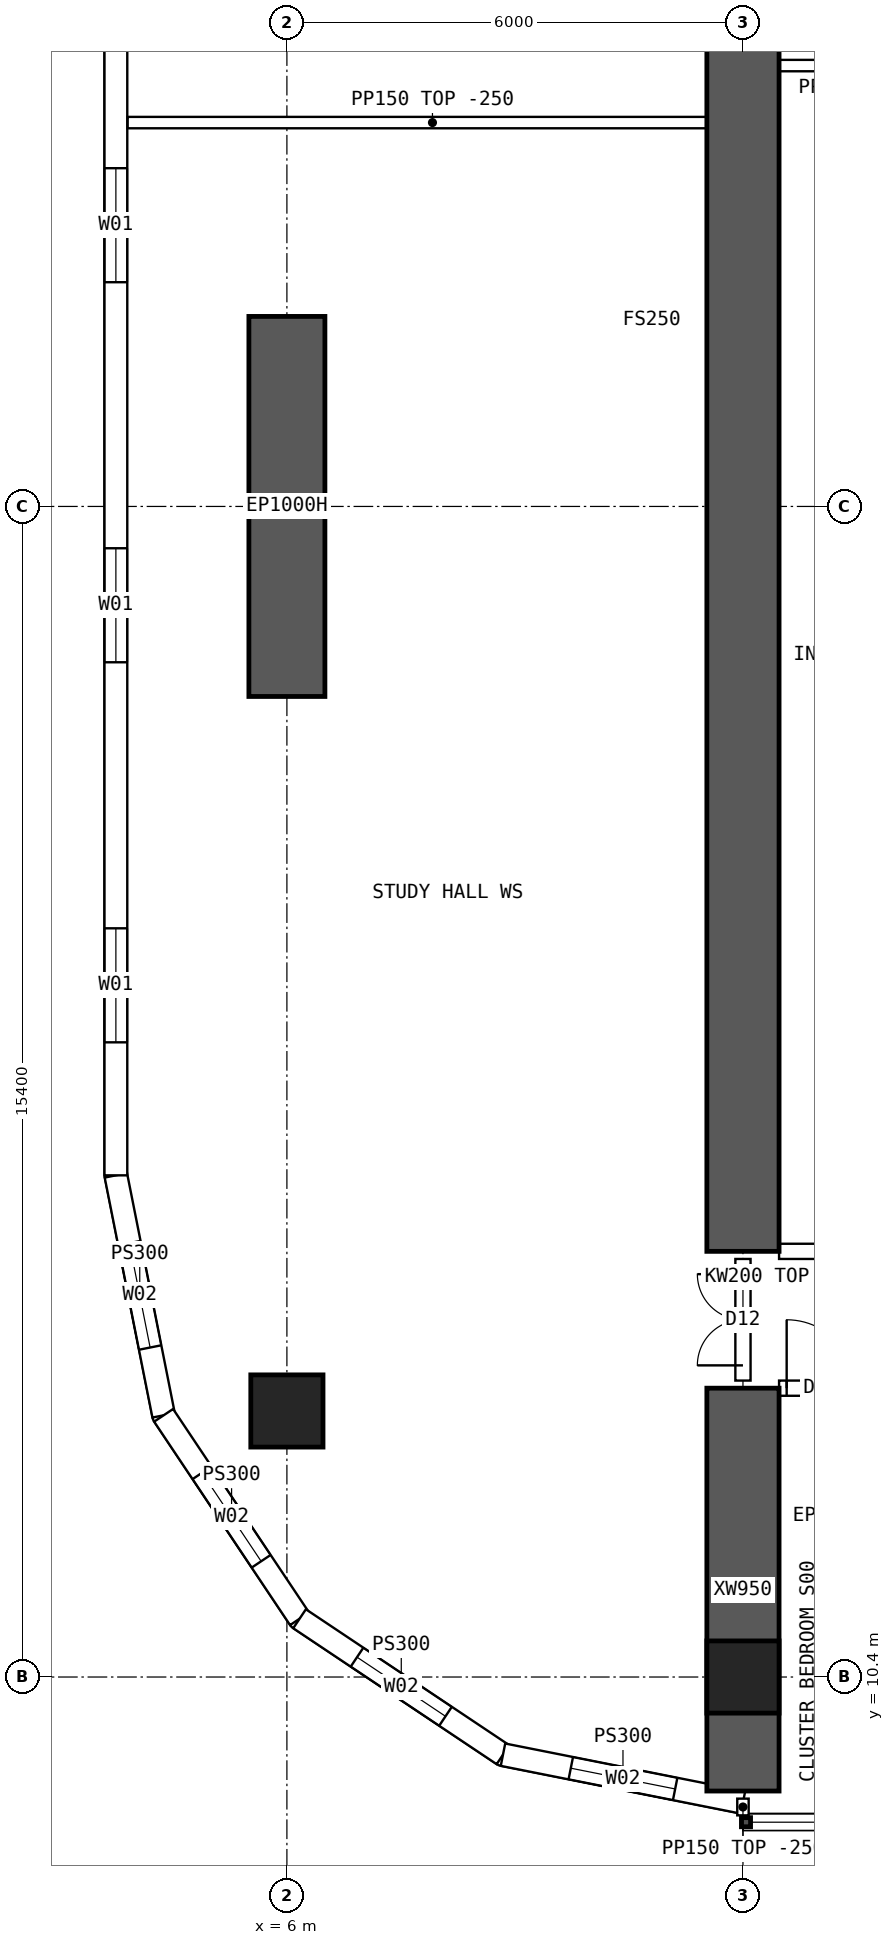
"""IFC4 building model, lengths in metres.
Left out: names, types, materials, properties, quantities, classifications, styles, units other than length and angle.
Written with IfcOpenShell. Run it as: python <this file> out.ifc"""

import sys

from ifc_helpers import new_model, si_unit, direction, frame, frame_2d, origin, origin_2d, place, context, subcontext, project, spatial, polyline, rectangle, hollow_rectangle, outline, extrude, element, fill, save


model = new_model("IFC4")
c1 = context("Model", 3, precision=1e-05, world=origin(), true_north=direction((0.0, 1.0)))
c2 = subcontext(c1, "Body", "Model", "MODEL_VIEW")
j1 = project(units=[si_unit("LENGTHUNIT", "METRE"), si_unit("PLANEANGLEUNIT", "RADIAN")], contexts=[c1])
p1 = place(None, origin())
s1 = spatial("IfcSite", under=j1, at=p1, CompositionType="ELEMENT")
p2 = place(p1, origin())
s2 = spatial("IfcBuilding", under=s1, at=p2, CompositionType="ELEMENT")
p3 = place(p2, frame((0.0, 0.0, 121.9)))
s3 = spatial("IfcBuildingStorey", under=s2, at=p3, CompositionType="ELEMENT", Elevation=121.9)
for number, where, z_axis, x_axis in (
    (1, (12.0, 10.4, 0.0), (0.0, 0.0, 1.0), (1.0, 0.0, 0.0)),
    (2, (6.0, 13.9, 0.0), (0.0, 0.0, 1.0), (1.0, 0.0, 0.0)),
):
    element("IfcColumn", number, at=place(p3, frame(where, z_axis=z_axis, x_axis=x_axis)), inside=s3, PredefinedType="COLUMN", context=c2, shape_type="SweptSolid", body=[
        extrude(hollow_rectangle(XDim=0.95, YDim=0.95, WallThickness=0.095, at=origin_2d()), origin(), (0.0, 0.0, 1.0), 3.75),
    ])
p4 = place(p3, frame((6.0, 23.3, 0.0), z_axis=(0.0, 0.0, 1.0), x_axis=(0.0, 1.0, 0.0)))
e3 = element("IfcWall", 3, at=p4, inside=s3, PredefinedType="SHEAR", context=c2, shape_type="SweptSolid", body=[
    extrude(rectangle(XDim=5.0, YDim=1.0, at=frame_2d((2.5, 0.0))), origin(), (0.0, 0.0, 1.0), 3.75),
])
p5 = place(p3, frame((12.0, 8.9, 0.0), z_axis=(0.0, 0.0, 1.0), x_axis=(0.0, 1.0, 0.0)))
e4 = element("IfcWall", 4, at=p5, inside=s3, PredefinedType="SHEAR", context=c2, shape_type="SweptSolid", body=[
    extrude(rectangle(XDim=5.3, YDim=0.95, at=frame_2d((2.65, 0.0))), origin(), (0.0, 0.0, 1.0), 3.75),
])
p6 = place(p3, frame((12.0, 16.0, 0.0), z_axis=(0.0, 0.0, 1.0), x_axis=(0.0, 1.0, 0.0)))
e5 = element("IfcWall", 5, at=p6, inside=s3, PredefinedType="SHEAR", context=c2, shape_type="SweptSolid", body=[
    extrude(rectangle(XDim=32.0, YDim=0.95, at=frame_2d((16.0, 0.0))), origin(), (0.0, 0.0, 1.0), 3.75),
])
p7 = place(p3, frame((3.75, 47.0, 0.0), z_axis=(0.0, 0.0, 1.0), x_axis=(0.0, -1.0, 0.0)))
e6 = element("IfcWall", 6, at=p7, inside=s3, PredefinedType="SOLIDWALL", context=c2, shape_type="SweptSolid", body=[
    extrude(outline(polyline([(-0.015, -0.15), (30.015, -0.15), (29.985, 0.15), (0.015, 0.15), (-0.015, -0.15)])), origin(), (0.0, 0.0, 1.0), 3.5),
])
p8 = place(p7, frame((1.75, 0.0, 0.9)))
e7 = element("IfcOpeningElement", 7, at=p8, cuts=e6, PredefinedType="OPENING", context=c2, shape_type="SweptSolid", body=[
    extrude(rectangle(XDim=1.5, YDim=2.0, at=frame_2d((0.75, 1.0))), frame((0.0, 0.16, 0.0), z_axis=(0.0, -1.0, 0.0), x_axis=(1.0, 0.0, 0.0)), (0.0, 0.0, 1.0), 0.32),
])
p9 = place(p7, frame((6.75, 0.0, 0.9)))
e8 = element("IfcOpeningElement", 8, at=p9, cuts=e6, PredefinedType="OPENING", context=c2, shape_type="SweptSolid", body=[
    extrude(rectangle(XDim=1.5, YDim=2.0, at=frame_2d((0.75, 1.0))), frame((0.0, 0.16, 0.0), z_axis=(0.0, -1.0, 0.0), x_axis=(1.0, 0.0, 0.0)), (0.0, 0.0, 1.0), 0.32),
])
p10 = place(p7, frame((11.75, 0.0, 0.9)))
e9 = element("IfcOpeningElement", 9, at=p10, cuts=e6, PredefinedType="OPENING", context=c2, shape_type="SweptSolid", body=[
    extrude(rectangle(XDim=1.5, YDim=2.0, at=frame_2d((0.75, 1.0))), frame((0.0, 0.16, 0.0), z_axis=(0.0, -1.0, 0.0), x_axis=(1.0, 0.0, 0.0)), (0.0, 0.0, 1.0), 0.32),
])
p11 = place(p7, frame((16.75, 0.0, 0.9)))
e10 = element("IfcOpeningElement", 10, at=p11, cuts=e6, PredefinedType="OPENING", context=c2, shape_type="SweptSolid", body=[
    extrude(rectangle(XDim=1.5, YDim=2.0, at=frame_2d((0.75, 1.0))), frame((0.0, 0.16, 0.0), z_axis=(0.0, -1.0, 0.0), x_axis=(1.0, 0.0, 0.0)), (0.0, 0.0, 1.0), 0.32),
])
p12 = place(p7, frame((21.75, 0.0, 0.9)))
e11 = element("IfcOpeningElement", 11, at=p12, cuts=e6, PredefinedType="OPENING", context=c2, shape_type="SweptSolid", body=[
    extrude(rectangle(XDim=1.5, YDim=2.0, at=frame_2d((0.75, 1.0))), frame((0.0, 0.16, 0.0), z_axis=(0.0, -1.0, 0.0), x_axis=(1.0, 0.0, 0.0)), (0.0, 0.0, 1.0), 0.32),
])
p13 = place(p7, frame((26.75, 0.0, 0.9)))
e12 = element("IfcOpeningElement", 12, at=p13, cuts=e6, PredefinedType="OPENING", context=c2, shape_type="SweptSolid", body=[
    extrude(rectangle(XDim=1.5, YDim=2.0, at=frame_2d((0.75, 1.0))), frame((0.0, 0.16, 0.0), z_axis=(0.0, -1.0, 0.0), x_axis=(1.0, 0.0, 0.0)), (0.0, 0.0, 1.0), 0.32),
])
p14 = place(p3, frame((3.75, 17.0, 0.0), z_axis=(0.0, 0.0, 1.0), x_axis=(0.195080412259, -0.980787251524, 0.0)))
e13 = element("IfcWall", 13, at=p14, inside=s3, PredefinedType="SOLIDWALL", context=c2, shape_type="SweptSolid", body=[
    extrude(outline(polyline([(-0.015, -0.15), (3.249, -0.15), (3.189, 0.15), (0.015, 0.15), (-0.015, -0.15)])), origin(), (0.0, 0.0, 1.0), 3.5),
])
p15 = place(p14, frame((0.909, 0.0, 0.9)))
e14 = element("IfcOpeningElement", 14, at=p15, cuts=e13, PredefinedType="OPENING", context=c2, shape_type="SweptSolid", body=[
    extrude(rectangle(XDim=1.4, YDim=1.8, at=frame_2d((0.7, 0.9))), frame((0.0, 0.16, 0.0), z_axis=(0.0, -1.0, 0.0), x_axis=(1.0, 0.0, 0.0)), (0.0, 0.0, 1.0), 0.32),
])
p16 = place(p3, frame((4.378, 13.843, 0.0), z_axis=(0.0, 0.0, 1.0), x_axis=(0.555609954424, -0.831443069936, 0.0)))
e15 = element("IfcWall", 15, at=p16, inside=s3, PredefinedType="SOLIDWALL", context=c2, shape_type="SweptSolid", body=[
    extrude(outline(polyline([(-0.03, -0.15), (3.249, -0.15), (3.189, 0.15), (0.03, 0.15), (-0.03, -0.15)])), origin(), (0.0, 0.0, 1.0), 3.5),
])
p17 = place(p16, frame((0.909, 0.0, 0.9)))
e16 = element("IfcOpeningElement", 16, at=p17, cuts=e15, PredefinedType="OPENING", context=c2, shape_type="SweptSolid", body=[
    extrude(rectangle(XDim=1.4, YDim=1.8, at=frame_2d((0.7, 0.9))), frame((0.0, 0.16, 0.0), z_axis=(0.0, -1.0, 0.0), x_axis=(1.0, 0.0, 0.0)), (0.0, 0.0, 1.0), 0.32),
])
p18 = place(p3, frame((6.167, 11.167, 0.0), z_axis=(0.0, 0.0, 1.0), x_axis=(0.831443069936, -0.555609954424, 0.0)))
e17 = element("IfcWall", 17, at=p18, inside=s3, PredefinedType="SOLIDWALL", context=c2, shape_type="SweptSolid", body=[
    extrude(outline(polyline([(-0.03, -0.15), (3.249, -0.15), (3.189, 0.15), (0.03, 0.15), (-0.03, -0.15)])), origin(), (0.0, 0.0, 1.0), 3.5),
])
p19 = place(p18, frame((0.909, 0.0, 0.9)))
e18 = element("IfcOpeningElement", 18, at=p19, cuts=e17, PredefinedType="OPENING", context=c2, shape_type="SweptSolid", body=[
    extrude(rectangle(XDim=1.4, YDim=1.8, at=frame_2d((0.7, 0.9))), frame((0.0, 0.16, 0.0), z_axis=(0.0, -1.0, 0.0), x_axis=(1.0, 0.0, 0.0)), (0.0, 0.0, 1.0), 0.32),
])
p20 = place(p3, frame((8.843, 9.378, 0.0), z_axis=(0.0, 0.0, 1.0), x_axis=(0.980787251524, -0.195080412259, 0.0)))
e19 = element("IfcWall", 19, at=p20, inside=s3, PredefinedType="SOLIDWALL", context=c2, shape_type="SweptSolid", body=[
    extrude(outline(polyline([(-0.03, -0.15), (3.249, -0.15), (3.189, 0.15), (0.03, 0.15), (-0.03, -0.15)])), origin(), (0.0, 0.0, 1.0), 3.5),
])
p21 = place(p20, frame((0.909, 0.0, 0.9)))
e20 = element("IfcOpeningElement", 20, at=p21, cuts=e19, PredefinedType="OPENING", context=c2, shape_type="SweptSolid", body=[
    extrude(rectangle(XDim=1.4, YDim=1.8, at=frame_2d((0.7, 0.9))), frame((0.0, 0.16, 0.0), z_axis=(0.0, -1.0, 0.0), x_axis=(1.0, 0.0, 0.0)), (0.0, 0.0, 1.0), 0.32),
])
p22 = place(p3, frame((12.475, 14.2, 0.0), z_axis=(0.0, 0.0, 1.0), x_axis=(1.0, 0.0, 0.0)))
e21 = element("IfcWall", 21, at=p22, inside=s3, PredefinedType="SOLIDWALL", context=c2, shape_type="SweptSolid", body=[
    extrude(outline(polyline([(0.0, 0.0), (5.05, 0.0), (5.05, 3.1), (0.0, 3.1), (0.0, 0.0)])), frame((0.0, 0.1, 0.0), z_axis=(0.0, -1.0, 0.0), x_axis=(1.0, 0.0, 0.0)), (0.0, 0.0, 1.0), 0.2),
])
p23 = place(p22, frame((0.1, 0.0, 0.0)))
e22 = element("IfcOpeningElement", 22, at=p23, cuts=e21, PredefinedType="OPENING", context=c2, shape_type="SweptSolid", body=[
    extrude(rectangle(XDim=0.9, YDim=2.1, at=frame_2d((0.45, 1.05))), frame((0.0, 0.11, 0.0), z_axis=(0.0, -1.0, 0.0), x_axis=(1.0, 0.0, 0.0)), (0.0, 0.0, 1.0), 0.22),
])
p24 = place(p22, frame((3.9, 0.0, 0.0)))
e23 = element("IfcOpeningElement", 23, at=p24, cuts=e21, PredefinedType="OPENING", context=c2, shape_type="SweptSolid", body=[
    extrude(rectangle(XDim=0.9, YDim=2.1, at=frame_2d((0.45, 1.05))), frame((0.0, 0.11, 0.0), z_axis=(0.0, -1.0, 0.0), x_axis=(1.0, 0.0, 0.0)), (0.0, 0.0, 1.0), 0.22),
])
p25 = place(p3, frame((12.475, 16.0, 0.0), z_axis=(0.0, 0.0, 1.0), x_axis=(1.0, 0.0, 0.0)))
e24 = element("IfcWall", 24, at=p25, inside=s3, PredefinedType="SOLIDWALL", context=c2, shape_type="SweptSolid", body=[
    extrude(rectangle(XDim=5.05, YDim=0.2, at=frame_2d((2.525, 0.0))), origin(), (0.0, 0.0, 1.0), 3.5),
])
p26 = place(p25, frame((3.325, 0.0, 0.0)))
e25 = element("IfcOpeningElement", 25, at=p26, cuts=e24, PredefinedType="OPENING", context=c2, shape_type="SweptSolid", body=[
    extrude(rectangle(XDim=1.6, YDim=2.1, at=frame_2d((0.8, 1.05))), frame((0.0, 0.11, 0.0), z_axis=(0.0, -1.0, 0.0), x_axis=(1.0, 0.0, 0.0)), (0.0, 0.0, 1.0), 0.22),
])
p27 = place(p3, frame((12.0, 31.6, 0.0), z_axis=(0.0, 0.0, 1.0), x_axis=(1.0, 0.0, 0.0)))
e26 = element("IfcWall", 26, at=p27, inside=s3, PredefinedType="PARTITIONING", context=c2, shape_type="SweptSolid", body=[
    extrude(rectangle(XDim=3.6, YDim=0.15, at=frame_2d((1.8, 0.0))), origin(), (0.0, 0.0, 1.0), 3.5),
])
p28 = place(p3, frame((3.905, 30.85, 0.0), z_axis=(0.0, 0.0, 1.0), x_axis=(1.0, 0.0, 0.0)))
e27 = element("IfcWall", 27, at=p28, inside=s3, PredefinedType="PARTITIONING", context=c2, shape_type="SweptSolid", body=[
    extrude(outline(polyline([(0.0, 0.0), (8.02, 0.0), (8.02, 3.5), (2.397, 3.5), (2.395, 3.05), (1.797, 3.05), (1.795, 3.5), (0.0, 3.5), (0.0, 0.0)])), frame((0.0, 0.075, 0.0), z_axis=(0.0, -1.0, 0.0), x_axis=(1.0, 0.0, 0.0)), (0.0, 0.0, 1.0), 0.15),
])
p29 = place(p3, frame((12.0, 14.3, 0.0), z_axis=(0.0, 0.0, 1.0), x_axis=(0.0, 1.0, 0.0)))
e28 = element("IfcWall", 28, at=p29, inside=s3, PredefinedType="SOLIDWALL", context=c2, shape_type="SweptSolid", body=[
    extrude(outline(polyline([(0.0, 0.0), (1.6, 0.0), (1.6, 3.1), (0.0, 3.1), (0.0, 0.0)])), frame((0.0, 0.1, 0.0), z_axis=(0.0, -1.0, 0.0), x_axis=(1.0, 0.0, 0.0)), (0.0, 0.0, 1.0), 0.2),
])
p30 = place(p29, frame((0.2, 0.0, 0.0)))
e29 = element("IfcOpeningElement", 29, at=p30, cuts=e28, PredefinedType="OPENING", context=c2, shape_type="SweptSolid", body=[
    extrude(rectangle(XDim=1.2, YDim=2.1, at=frame_2d((0.6, 1.05))), frame((0.0, 0.11, 0.0), z_axis=(0.0, -1.0, 0.0), x_axis=(1.0, 0.0, 0.0)), (0.0, 0.0, 1.0), 0.22),
])
p31 = place(p3, frame((12.0, 8.8, 0.0), z_axis=(0.0, 0.0, 1.0), x_axis=(0.0, -1.0, 0.0)))
e30 = element("IfcWall", 30, at=p31, inside=s3, PredefinedType="PARTITIONING", context=c2, shape_type="SweptSolid", body=[
    extrude(rectangle(XDim=0.22, YDim=0.15, at=frame_2d((0.11, 0.0))), origin(), (0.0, 0.0, 1.0), 3.5),
])
p32 = place(p11, origin())
e31 = element("IfcWindow", 31, at=p32, inside=s3, PartitioningType="SINGLE_PANEL", PredefinedType="WINDOW", context=c2, shape_type="SweptSolid", body=[
    extrude(rectangle(XDim=1.5, YDim=2.0, at=frame_2d((0.75, 1.0))), frame((0.0, 0.03, 0.0), z_axis=(0.0, -1.0, 0.0), x_axis=(1.0, 0.0, 0.0)), (0.0, 0.0, 1.0), 0.06),
])
fill(e10, e31)
p33 = place(p12, origin())
e32 = element("IfcWindow", 32, at=p33, inside=s3, PartitioningType="SINGLE_PANEL", PredefinedType="WINDOW", context=c2, shape_type="SweptSolid", body=[
    extrude(rectangle(XDim=1.5, YDim=2.0, at=frame_2d((0.75, 1.0))), frame((0.0, 0.03, 0.0), z_axis=(0.0, -1.0, 0.0), x_axis=(1.0, 0.0, 0.0)), (0.0, 0.0, 1.0), 0.06),
])
fill(e11, e32)
p34 = place(p13, origin())
e33 = element("IfcWindow", 33, at=p34, inside=s3, PartitioningType="SINGLE_PANEL", PredefinedType="WINDOW", context=c2, shape_type="SweptSolid", body=[
    extrude(rectangle(XDim=1.5, YDim=2.0, at=frame_2d((0.75, 1.0))), frame((0.0, 0.03, 0.0), z_axis=(0.0, -1.0, 0.0), x_axis=(1.0, 0.0, 0.0)), (0.0, 0.0, 1.0), 0.06),
])
fill(e12, e33)
p35 = place(p15, origin())
e34 = element("IfcWindow", 34, at=p35, inside=s3, PartitioningType="SINGLE_PANEL", PredefinedType="WINDOW", context=c2, shape_type="SweptSolid", body=[
    extrude(rectangle(XDim=1.4, YDim=1.8, at=frame_2d((0.7, 0.9))), frame((0.0, 0.03, 0.0), z_axis=(0.0, -1.0, 0.0), x_axis=(1.0, 0.0, 0.0)), (0.0, 0.0, 1.0), 0.06),
])
fill(e14, e34)
p36 = place(p17, origin())
e35 = element("IfcWindow", 35, at=p36, inside=s3, PartitioningType="SINGLE_PANEL", PredefinedType="WINDOW", context=c2, shape_type="SweptSolid", body=[
    extrude(rectangle(XDim=1.4, YDim=1.8, at=frame_2d((0.7, 0.9))), frame((0.0, 0.03, 0.0), z_axis=(0.0, -1.0, 0.0), x_axis=(1.0, 0.0, 0.0)), (0.0, 0.0, 1.0), 0.06),
])
fill(e16, e35)
p37 = place(p19, origin())
e36 = element("IfcWindow", 36, at=p37, inside=s3, PartitioningType="SINGLE_PANEL", PredefinedType="WINDOW", context=c2, shape_type="SweptSolid", body=[
    extrude(rectangle(XDim=1.4, YDim=1.8, at=frame_2d((0.7, 0.9))), frame((0.0, 0.03, 0.0), z_axis=(0.0, -1.0, 0.0), x_axis=(1.0, 0.0, 0.0)), (0.0, 0.0, 1.0), 0.06),
])
fill(e18, e36)
p38 = place(p21, origin())
e37 = element("IfcWindow", 37, at=p38, inside=s3, PartitioningType="SINGLE_PANEL", PredefinedType="WINDOW", context=c2, shape_type="SweptSolid", body=[
    extrude(rectangle(XDim=1.4, YDim=1.8, at=frame_2d((0.7, 0.9))), frame((0.0, 0.03, 0.0), z_axis=(0.0, -1.0, 0.0), x_axis=(1.0, 0.0, 0.0)), (0.0, 0.0, 1.0), 0.06),
])
fill(e20, e37)
p39 = place(p23, origin())
e38 = element("IfcDoor", 38, at=p39, inside=s3, OperationType="SINGLE_SWING_LEFT", PredefinedType="DOOR", context=c2, shape_type="SweptSolid", body=[
    extrude(rectangle(XDim=0.9, YDim=2.1, at=frame_2d((0.45, 1.05))), frame((0.0, 0.025, 0.0), z_axis=(0.0, -1.0, 0.0), x_axis=(1.0, 0.0, 0.0)), (0.0, 0.0, 1.0), 0.05),
])
fill(e22, e38)
p40 = place(p30, origin())
e39 = element("IfcDoor", 39, at=p40, inside=s3, OperationType="DOUBLE_DOOR_SINGLE_SWING", PredefinedType="DOOR", context=c2, shape_type="SweptSolid", body=[
    extrude(rectangle(XDim=1.2, YDim=2.1, at=frame_2d((0.6, 1.05))), frame((0.0, 0.025, 0.0), z_axis=(0.0, -1.0, 0.0), x_axis=(1.0, 0.0, 0.0)), (0.0, 0.0, 1.0), 0.05),
])
fill(e29, e39)
save(model, sys.argv[1])
